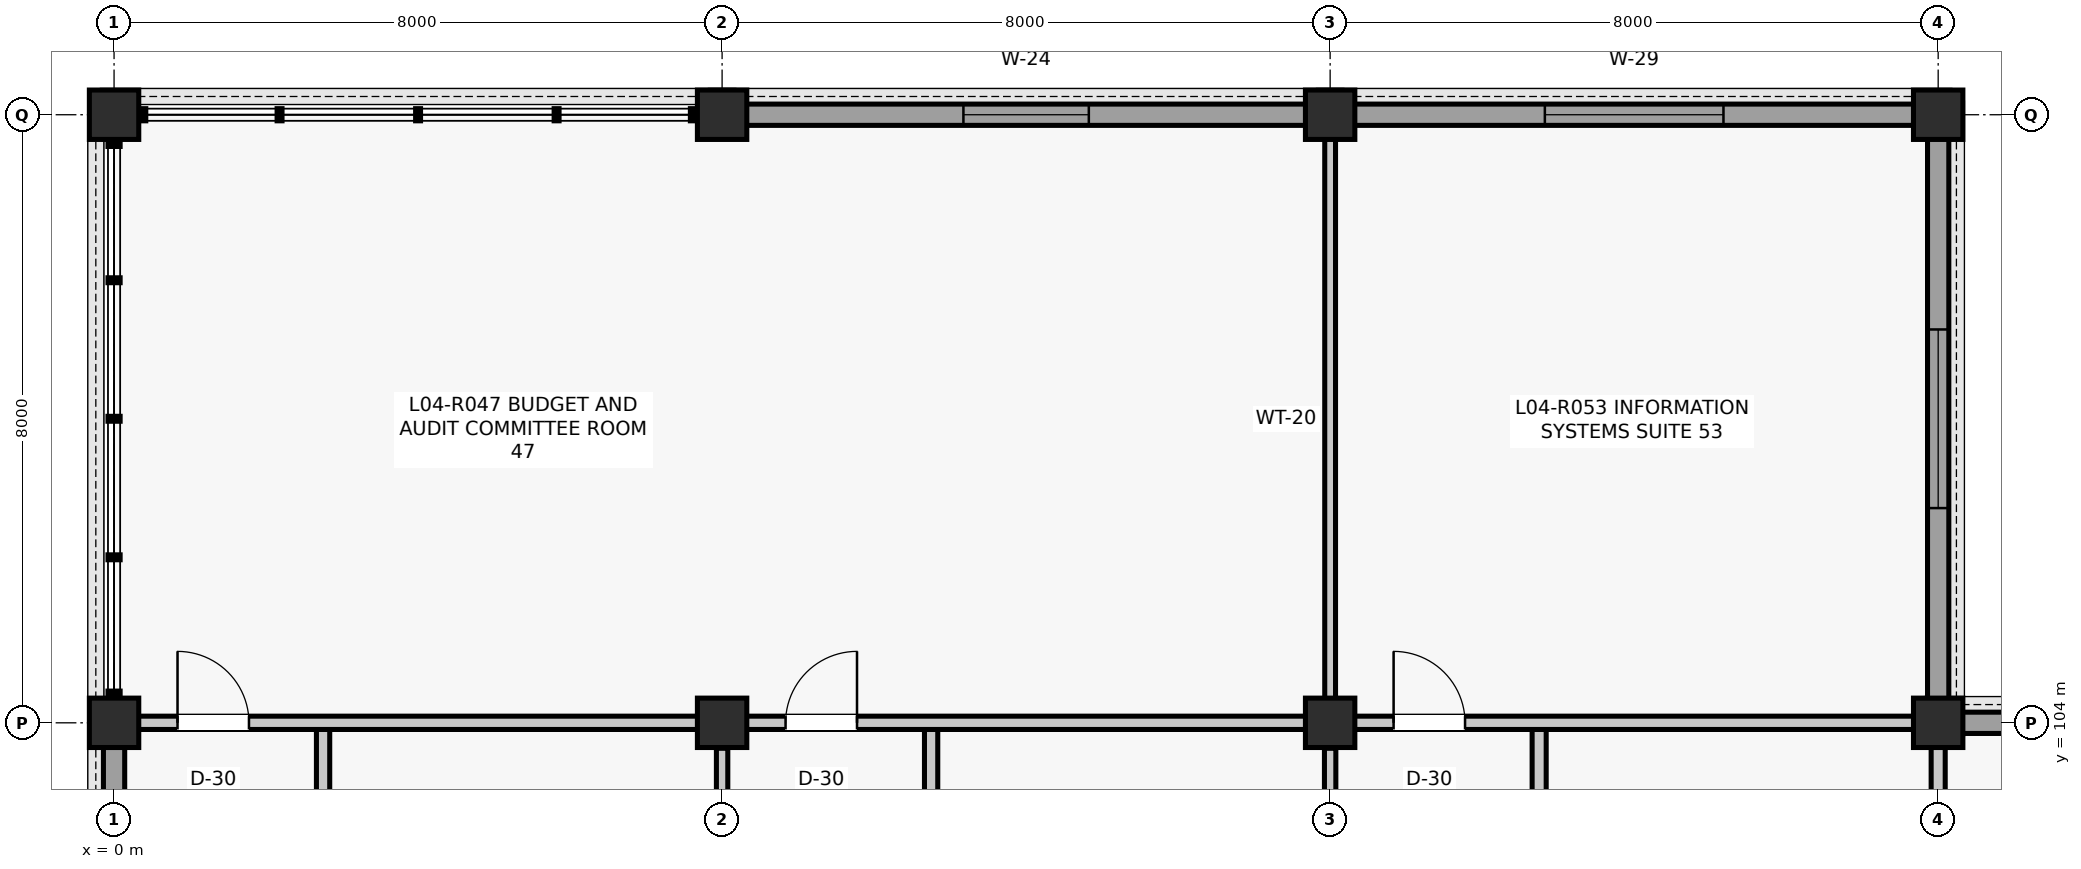
"""IFC4 building model, lengths in metres.
Left out: names, types, materials, properties, quantities, classifications, styles, units other than length and angle.
Written with IfcOpenShell. Run it as: python <this file> out.ifc"""

import sys

from ifc_helpers import new_model, si_unit, direction, frame, frame_2d, origin, origin_2d, place, context, subcontext, project, spatial, rectangle, extrude, element, fill, save


model = new_model("IFC4")
c1 = context("Model", 3, precision=1e-05, world=origin(), true_north=direction((0.0, 1.0)))
c2 = subcontext(c1, "Body", "Model", "MODEL_VIEW")
j1 = project(units=[si_unit("LENGTHUNIT", "METRE"), si_unit("PLANEANGLEUNIT", "RADIAN")], contexts=[c1])
p1 = place(None, origin())
s1 = spatial("IfcSite", under=j1, at=p1, CompositionType="ELEMENT")
p2 = place(p1, origin())
s2 = spatial("IfcBuilding", under=s1, at=p2, CompositionType="ELEMENT")
p3 = place(p2, frame((0.0, 0.0, 17.82)))
s3 = spatial("IfcBuildingStorey", under=s2, at=p3, CompositionType="ELEMENT", Elevation=17.82)
for number, where, z_axis, x_axis in (
    (1, (0.0, 104.0, 0.0), (0.0, 0.0, 1.0), (1.0, 0.0, 0.0)),
    (2, (0.0, 112.0, 0.0), (0.0, 0.0, 1.0), (1.0, 0.0, 0.0)),
    (3, (8.0, 104.0, 0.0), (0.0, 0.0, 1.0), (1.0, 0.0, 0.0)),
    (4, (8.0, 112.0, 0.0), (0.0, 0.0, 1.0), (1.0, 0.0, 0.0)),
    (5, (16.0, 104.0, 0.0), (0.0, 0.0, 1.0), (1.0, 0.0, 0.0)),
    (6, (16.0, 112.0, 0.0), (0.0, 0.0, 1.0), (1.0, 0.0, 0.0)),
    (7, (24.0, 104.0, 0.0), (0.0, 0.0, 1.0), (1.0, 0.0, 0.0)),
    (8, (24.0, 112.0, 0.0), (0.0, 0.0, 1.0), (1.0, 0.0, 0.0)),
):
    element("IfcColumn", number, at=place(p3, frame(where, z_axis=z_axis, x_axis=x_axis)), inside=s3, PredefinedType="COLUMN", context=c2, shape_type="SweptSolid", body=[
        extrude(rectangle(XDim=0.65, YDim=0.65, at=origin_2d()), origin(), (0.0, 0.0, 1.0), 3.96),
    ])
p4 = place(p3, frame((0.0, 96.31, 0.0), z_axis=(0.0, 0.0, 1.0), x_axis=(0.0, 1.0, 0.0)))
e9 = element("IfcWall", 9, at=p4, inside=s3, PredefinedType="SOLIDWALL", context=c2, shape_type="SweptSolid", body=[
    extrude(rectangle(XDim=7.38, YDim=0.28, at=frame_2d((3.69, 0.0))), origin(), (0.0, 0.0, 1.0), 3.31),
])
p5 = place(p4, frame((0.729, 0.0, 0.95)))
e10 = element("IfcOpeningElement", 10, at=p5, cuts=e9, PredefinedType="OPENING", context=c2, shape_type="SweptSolid", body=[
    extrude(rectangle(XDim=1.2, YDim=1.8, at=frame_2d((0.6, 0.9))), frame((0.0, 0.15, 0.0), z_axis=(0.0, -1.0, 0.0), x_axis=(1.0, 0.0, 0.0)), (0.0, 0.0, 1.0), 0.3),
])
p6 = place(p4, frame((5.452, 0.0, 0.95)))
e11 = element("IfcOpeningElement", 11, at=p6, cuts=e9, PredefinedType="OPENING", context=c2, shape_type="SweptSolid", body=[
    extrude(rectangle(XDim=1.2, YDim=1.8, at=frame_2d((0.6, 0.9))), frame((0.0, 0.15, 0.0), z_axis=(0.0, -1.0, 0.0), x_axis=(1.0, 0.0, 0.0)), (0.0, 0.0, 1.0), 0.3),
])
p7 = place(p3, frame((8.31, 112.0, 0.0), z_axis=(0.0, 0.0, 1.0), x_axis=(1.0, 0.0, 0.0)))
e12 = element("IfcWall", 12, at=p7, inside=s3, PredefinedType="SOLIDWALL", context=c2, shape_type="SweptSolid", body=[
    extrude(rectangle(XDim=7.38, YDim=0.28, at=frame_2d((3.69, 0.0))), origin(), (0.0, 0.0, 1.0), 3.377),
])
p8 = place(p7, frame((2.865, 0.0, 0.9)))
e13 = element("IfcOpeningElement", 13, at=p8, cuts=e12, PredefinedType="OPENING", context=c2, shape_type="SweptSolid", body=[
    extrude(rectangle(XDim=1.65, YDim=1.75, at=frame_2d((0.825, 0.875))), frame((0.0, 0.15, 0.0), z_axis=(0.0, -1.0, 0.0), x_axis=(1.0, 0.0, 0.0)), (0.0, 0.0, 1.0), 0.3),
])
p9 = place(p3, frame((16.31, 112.0, 0.0), z_axis=(0.0, 0.0, 1.0), x_axis=(1.0, 0.0, 0.0)))
e14 = element("IfcWall", 14, at=p9, inside=s3, PredefinedType="SOLIDWALL", context=c2, shape_type="SweptSolid", body=[
    extrude(rectangle(XDim=7.38, YDim=0.28, at=frame_2d((3.69, 0.0))), origin(), (0.0, 0.0, 1.0), 3.285),
])
p10 = place(p9, frame((2.515, 0.0, 0.9)))
e15 = element("IfcOpeningElement", 15, at=p10, cuts=e14, PredefinedType="OPENING", context=c2, shape_type="SweptSolid", body=[
    extrude(rectangle(XDim=2.35, YDim=1.7, at=frame_2d((1.175, 0.85))), frame((0.0, 0.15, 0.0), z_axis=(0.0, -1.0, 0.0), x_axis=(1.0, 0.0, 0.0)), (0.0, 0.0, 1.0), 0.3),
])
p11 = place(p3, frame((24.0, 104.31, 0.0), z_axis=(0.0, 0.0, 1.0), x_axis=(0.0, 1.0, 0.0)))
e16 = element("IfcWall", 16, at=p11, inside=s3, PredefinedType="SOLIDWALL", context=c2, shape_type="SweptSolid", body=[
    extrude(rectangle(XDim=7.38, YDim=0.28, at=frame_2d((3.69, 0.0))), origin(), (0.0, 0.0, 1.0), 3.285),
])
p12 = place(p11, frame((2.515, 0.0, 0.9)))
e17 = element("IfcOpeningElement", 17, at=p12, cuts=e16, PredefinedType="OPENING", context=c2, shape_type="SweptSolid", body=[
    extrude(rectangle(XDim=2.35, YDim=1.7, at=frame_2d((1.175, 0.85))), frame((0.0, 0.15, 0.0), z_axis=(0.0, -1.0, 0.0), x_axis=(1.0, 0.0, 0.0)), (0.0, 0.0, 1.0), 0.3),
])
p13 = place(p3, frame((24.31, 104.0, 0.0), z_axis=(0.0, 0.0, 1.0), x_axis=(1.0, 0.0, 0.0)))
e18 = element("IfcWall", 18, at=p13, inside=s3, PredefinedType="SOLIDWALL", context=c2, shape_type="SweptSolid", body=[
    extrude(rectangle(XDim=7.355, YDim=0.28, at=frame_2d((3.677, 0.0))), origin(), (0.0, 0.0, 1.0), 3.31),
])
p14 = place(p13, frame((2.502, 0.0, 0.9)))
e19 = element("IfcOpeningElement", 19, at=p14, cuts=e18, PredefinedType="OPENING", context=c2, shape_type="SweptSolid", body=[
    extrude(rectangle(XDim=2.35, YDim=1.7, at=frame_2d((1.175, 0.85))), frame((0.0, 0.15, 0.0), z_axis=(0.0, -1.0, 0.0), x_axis=(1.0, 0.0, 0.0)), (0.0, 0.0, 1.0), 0.3),
])
p15 = place(p3, frame((2.75, 98.7, 0.0), z_axis=(0.0, 0.0, 1.0), x_axis=(0.0, 1.0, 0.0)))
e20 = element("IfcWall", 20, at=p15, inside=s3, PredefinedType="PARTITIONING", context=c2, shape_type="SweptSolid", body=[
    extrude(rectangle(XDim=5.28, YDim=0.175, at=frame_2d((2.64, 0.0))), origin(), (0.0, 0.0, 1.0), 3.263),
])
p16 = place(p3, frame((8.0, 98.75, 0.0), z_axis=(0.0, 0.0, 1.0), x_axis=(0.0, 1.0, 0.0)))
e21 = element("IfcWall", 21, at=p16, inside=s3, PredefinedType="PARTITIONING", context=c2, shape_type="SweptSolid", body=[
    extrude(rectangle(XDim=4.915, YDim=0.15, at=frame_2d((2.458, 0.0))), origin(), (0.0, 0.0, 1.0), 3.263),
])
p17 = place(p3, frame((10.75, 98.7, 0.0), z_axis=(0.0, 0.0, 1.0), x_axis=(0.0, 1.0, 0.0)))
e22 = element("IfcWall", 22, at=p17, inside=s3, PredefinedType="PARTITIONING", context=c2, shape_type="SweptSolid", body=[
    extrude(rectangle(XDim=5.28, YDim=0.175, at=frame_2d((2.64, 0.0))), origin(), (0.0, 0.0, 1.0), 3.251),
])
p18 = place(p3, frame((16.0, 98.75, 0.0), z_axis=(0.0, 0.0, 1.0), x_axis=(0.0, 1.0, 0.0)))
e23 = element("IfcWall", 23, at=p18, inside=s3, PredefinedType="PARTITIONING", context=c2, shape_type="SweptSolid", body=[
    extrude(rectangle(XDim=4.915, YDim=0.15, at=frame_2d((2.458, 0.0))), origin(), (0.0, 0.0, 1.0), 3.462),
])
p19 = place(p3, frame((18.75, 98.7, 0.0), z_axis=(0.0, 0.0, 1.0), x_axis=(0.0, 1.0, 0.0)))
e24 = element("IfcWall", 24, at=p19, inside=s3, PredefinedType="PARTITIONING", context=c2, shape_type="SweptSolid", body=[
    extrude(rectangle(XDim=5.28, YDim=0.185, at=frame_2d((2.64, 0.0))), origin(), (0.0, 0.0, 1.0), 3.41),
])
p20 = place(p3, frame((0.315, 104.0, 0.0), z_axis=(0.0, 0.0, 1.0), x_axis=(1.0, 0.0, 0.0)))
e25 = element("IfcWall", 25, at=p20, inside=s3, PredefinedType="PARTITIONING", context=c2, shape_type="SweptSolid", body=[
    extrude(rectangle(XDim=7.37, YDim=0.175, at=frame_2d((3.685, 0.0))), origin(), (0.0, 0.0, 1.0), 3.263),
])
p21 = place(p20, frame((0.52, 0.0, 0.0)))
e26 = element("IfcOpeningElement", 26, at=p21, cuts=e25, PredefinedType="OPENING", context=c2, shape_type="SweptSolid", body=[
    extrude(rectangle(XDim=0.94, YDim=2.12, at=frame_2d((0.47, 1.06))), frame((0.0, 0.097, 0.0), z_axis=(0.0, -1.0, 0.0), x_axis=(1.0, 0.0, 0.0)), (0.0, 0.0, 1.0), 0.195),
])
p22 = place(p3, frame((8.315, 104.0, 0.0), z_axis=(0.0, 0.0, 1.0), x_axis=(1.0, 0.0, 0.0)))
e27 = element("IfcWall", 27, at=p22, inside=s3, PredefinedType="PARTITIONING", context=c2, shape_type="SweptSolid", body=[
    extrude(rectangle(XDim=7.37, YDim=0.175, at=frame_2d((3.685, 0.0))), origin(), (0.0, 0.0, 1.0), 3.251),
])
p23 = place(p22, frame((0.52, 0.0, 0.0)))
e28 = element("IfcOpeningElement", 28, at=p23, cuts=e27, PredefinedType="OPENING", context=c2, shape_type="SweptSolid", body=[
    extrude(rectangle(XDim=0.94, YDim=2.12, at=frame_2d((0.47, 1.06))), frame((0.0, 0.097, 0.0), z_axis=(0.0, -1.0, 0.0), x_axis=(1.0, 0.0, 0.0)), (0.0, 0.0, 1.0), 0.195),
])
p24 = place(p3, frame((16.0, 104.315, 0.0), z_axis=(0.0, 0.0, 1.0), x_axis=(0.0, 1.0, 0.0)))
e29 = element("IfcWall", 29, at=p24, inside=s3, PredefinedType="PARTITIONING", context=c2, shape_type="SweptSolid", body=[
    extrude(rectangle(XDim=7.37, YDim=0.142, at=frame_2d((3.685, 0.0))), origin(), (0.0, 0.0, 1.0), 3.232),
])
p25 = place(p3, frame((24.0, 96.315, 0.0), z_axis=(0.0, 0.0, 1.0), x_axis=(0.0, 1.0, 0.0)))
e30 = element("IfcWall", 30, at=p25, inside=s3, PredefinedType="PARTITIONING", context=c2, shape_type="SweptSolid", body=[
    extrude(rectangle(XDim=7.37, YDim=0.185, at=frame_2d((3.685, 0.0))), origin(), (0.0, 0.0, 1.0), 3.257),
])
p26 = place(p25, frame((0.52, 0.0, 0.0)))
e31 = element("IfcOpeningElement", 31, at=p26, cuts=e30, PredefinedType="OPENING", context=c2, shape_type="SweptSolid", body=[
    extrude(rectangle(XDim=0.94, YDim=2.12, at=frame_2d((0.47, 1.06))), frame((0.0, 0.103, 0.0), z_axis=(0.0, -1.0, 0.0), x_axis=(1.0, 0.0, 0.0)), (0.0, 0.0, 1.0), 0.205),
])
p27 = place(p3, frame((16.315, 104.0, 0.0), z_axis=(0.0, 0.0, 1.0), x_axis=(1.0, 0.0, 0.0)))
e32 = element("IfcWall", 32, at=p27, inside=s3, PredefinedType="PARTITIONING", context=c2, shape_type="SweptSolid", body=[
    extrude(rectangle(XDim=7.37, YDim=0.175, at=frame_2d((3.685, 0.0))), origin(), (0.0, 0.0, 1.0), 3.437),
])
p28 = place(p27, frame((0.52, 0.0, 0.0)))
e33 = element("IfcOpeningElement", 33, at=p28, cuts=e32, PredefinedType="OPENING", context=c2, shape_type="SweptSolid", body=[
    extrude(rectangle(XDim=0.94, YDim=2.12, at=frame_2d((0.47, 1.06))), frame((0.0, 0.097, 0.0), z_axis=(0.0, -1.0, 0.0), x_axis=(1.0, 0.0, 0.0)), (0.0, 0.0, 1.0), 0.195),
])
p29 = place(p8, origin())
e34 = element("IfcWindow", 34, at=p29, inside=s3, PartitioningType="SINGLE_PANEL", PredefinedType="WINDOW", context=c2, shape_type="SweptSolid", body=[
    extrude(rectangle(XDim=1.65, YDim=1.75, at=frame_2d((0.825, 0.875))), frame((0.0, 0.03, 0.0), z_axis=(0.0, -1.0, 0.0), x_axis=(1.0, 0.0, 0.0)), (0.0, 0.0, 1.0), 0.06),
])
fill(e13, e34)
p30 = place(p10, origin())
e35 = element("IfcWindow", 35, at=p30, inside=s3, PartitioningType="SINGLE_PANEL", PredefinedType="WINDOW", context=c2, shape_type="SweptSolid", body=[
    extrude(rectangle(XDim=2.35, YDim=1.7, at=frame_2d((1.175, 0.85))), frame((0.0, 0.03, 0.0), z_axis=(0.0, -1.0, 0.0), x_axis=(1.0, 0.0, 0.0)), (0.0, 0.0, 1.0), 0.06),
])
fill(e15, e35)
p31 = place(p12, origin())
e36 = element("IfcWindow", 36, at=p31, inside=s3, PartitioningType="SINGLE_PANEL", PredefinedType="WINDOW", context=c2, shape_type="SweptSolid", body=[
    extrude(rectangle(XDim=2.35, YDim=1.7, at=frame_2d((1.175, 0.85))), frame((0.0, 0.03, 0.0), z_axis=(0.0, -1.0, 0.0), x_axis=(1.0, 0.0, 0.0)), (0.0, 0.0, 1.0), 0.06),
])
fill(e17, e36)
p32 = place(p21, origin())
e37 = element("IfcDoor", 37, at=p32, inside=s3, OperationType="SINGLE_SWING_LEFT", PredefinedType="DOOR", context=c2, shape_type="SweptSolid", body=[
    extrude(rectangle(XDim=0.94, YDim=2.12, at=frame_2d((0.47, 1.06))), frame((0.0, 0.025, 0.0), z_axis=(0.0, -1.0, 0.0), x_axis=(1.0, 0.0, 0.0)), (0.0, 0.0, 1.0), 0.05),
])
fill(e26, e37)
p33 = place(p23, origin())
e38 = element("IfcDoor", 38, at=p33, inside=s3, OperationType="SINGLE_SWING_RIGHT", PredefinedType="DOOR", context=c2, shape_type="SweptSolid", body=[
    extrude(rectangle(XDim=0.94, YDim=2.12, at=frame_2d((0.47, 1.06))), frame((0.0, 0.025, 0.0), z_axis=(0.0, -1.0, 0.0), x_axis=(1.0, 0.0, 0.0)), (0.0, 0.0, 1.0), 0.05),
])
fill(e28, e38)
p34 = place(p28, origin())
e39 = element("IfcDoor", 39, at=p34, inside=s3, OperationType="SINGLE_SWING_LEFT", PredefinedType="DOOR", context=c2, shape_type="SweptSolid", body=[
    extrude(rectangle(XDim=0.94, YDim=2.12, at=frame_2d((0.47, 1.06))), frame((0.0, 0.025, 0.0), z_axis=(0.0, -1.0, 0.0), x_axis=(1.0, 0.0, 0.0)), (0.0, 0.0, 1.0), 0.05),
])
fill(e33, e39)
save(model, sys.argv[1])
